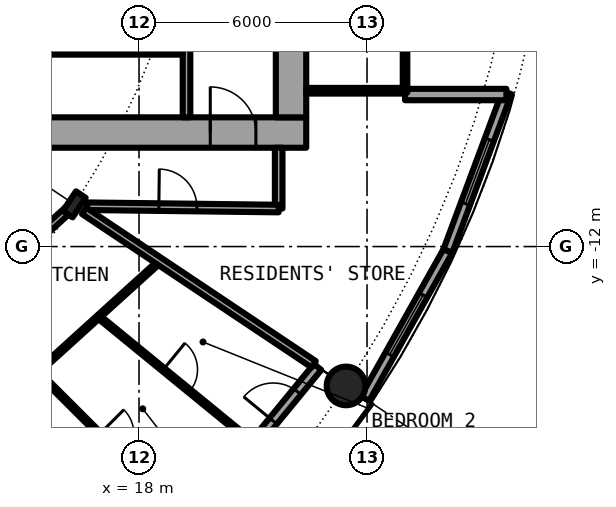
"""IFC4 building model, lengths in metres.
Left out: names, types, materials, properties, quantities, classifications, styles, units other than length and angle.
Written with IfcOpenShell. Run it as: python <this file> out.ifc"""

import sys

from ifc_helpers import new_model, si_unit, direction, frame, frame_2d, origin, origin_2d, place, context, subcontext, project, spatial, rectangle, hollow_circle, i_section, extrude, element, fill, save


model = new_model("IFC4")
c1 = context("Model", 3, precision=1e-05, world=origin(), true_north=direction((0.0, 1.0)))
c2 = subcontext(c1, "Body", "Model", "MODEL_VIEW")
j1 = project(units=[si_unit("LENGTHUNIT", "METRE"), si_unit("PLANEANGLEUNIT", "RADIAN")], contexts=[c1])
p1 = place(None, origin())
s1 = spatial("IfcSite", under=j1, at=p1, CompositionType="ELEMENT")
p2 = place(p1, origin())
s2 = spatial("IfcBuilding", under=s1, at=p2, CompositionType="ELEMENT")
p3 = place(p2, frame((0.0, 0.0, 41.1)))
s3 = spatial("IfcBuildingStorey", under=s2, at=p3, CompositionType="ELEMENT", Elevation=41.1)
p4 = place(p3, frame((23.448, -15.667, 0.0), z_axis=(0.0, 0.0, 1.0), x_axis=(1.0, 0.0, 0.0)))
e1 = element("IfcColumn", 1, at=p4, inside=s3, PredefinedType="COLUMN", context=c2, shape_type="SweptSolid", body=[
    extrude(hollow_circle(Radius=0.508, WallThickness=0.05, at=origin_2d()), origin(), (0.0, 0.0, 1.0), 3.05),
])
p5 = place(p3, frame((16.297, -10.889, 0.0), z_axis=(0.0, 0.0, 1.0), x_axis=(0.831469612303, -0.55557023302, 0.0)))
e2 = element("IfcColumn", 2, at=p5, inside=s3, PredefinedType="COLUMN", context=c2, shape_type="SweptSolid", body=[
    extrude(i_section(OverallWidth=0.305, OverallDepth=0.62, WebThickness=0.021, FlangeThickness=0.04, FilletRadius=0.027, at=origin_2d()), origin(), (0.0, 0.0, 1.0), 3.05),
])
p6 = place(p3, frame((19.304, -19.304, 0.0), z_axis=(0.0, 0.0, 1.0), x_axis=(0.634382322723, 0.773019449054, 0.0)))
e3 = element("IfcWall", 3, at=p6, inside=s3, PredefinedType="SOLIDWALL", context=c2, shape_type="SweptSolid", body=[
    extrude(rectangle(XDim=5.352, YDim=0.25, at=frame_2d((2.676, 0.0))), origin(), (0.0, 0.0, 1.0), 2.7),
])
p7 = place(p6, frame((0.441, 0.0, 0.3)))
e4 = element("IfcOpeningElement", 4, at=p7, cuts=e3, PredefinedType="OPENING", context=c2, shape_type="SweptSolid", body=[
    extrude(rectangle(XDim=1.8, YDim=2.1, at=frame_2d((0.9, 1.05))), frame((0.0, 0.135, 0.0), z_axis=(0.0, -1.0, 0.0), x_axis=(1.0, 0.0, 0.0)), (0.0, 0.0, 1.0), 0.27),
])
p8 = place(p6, frame((3.51, 0.0, 0.0)))
e5 = element("IfcOpeningElement", 5, at=p8, cuts=e3, PredefinedType="OPENING", context=c2, shape_type="SweptSolid", body=[
    extrude(rectangle(XDim=1.0, YDim=2.2, at=frame_2d((0.5, 1.1))), frame((0.0, 0.135, 0.0), z_axis=(0.0, -1.0, 0.0), x_axis=(1.0, 0.0, 0.0)), (0.0, 0.0, 1.0), 0.27),
])
p9 = place(p3, frame((23.946, -16.0, 0.0), z_axis=(0.0, 0.0, 1.0), x_axis=(0.489696356642, 0.871893042919, 0.0)))
e6 = element("IfcWall", 6, at=p9, inside=s3, PredefinedType="SOLIDWALL", context=c2, shape_type="SweptSolid", body=[
    extrude(rectangle(XDim=4.454, YDim=0.25, at=frame_2d((2.227, 0.0))), origin(), (0.0, 0.0, 1.0), 2.7),
])
p10 = place(p9, frame((1.327, 0.0, 0.3)))
e7 = element("IfcOpeningElement", 7, at=p10, cuts=e6, PredefinedType="OPENING", context=c2, shape_type="SweptSolid", body=[
    extrude(rectangle(XDim=1.8, YDim=2.1, at=frame_2d((0.9, 1.05))), frame((0.0, 0.135, 0.0), z_axis=(0.0, -1.0, 0.0), x_axis=(1.0, 0.0, 0.0)), (0.0, 0.0, 1.0), 0.27),
])
p11 = place(p3, frame((26.127, -12.117, 0.0), z_axis=(0.0, 0.0, 1.0), x_axis=(0.349247811493, 0.937030397675, 0.0)))
e8 = element("IfcWall", 8, at=p11, inside=s3, PredefinedType="SOLIDWALL", context=c2, shape_type="SweptSolid", body=[
    extrude(rectangle(XDim=4.452, YDim=0.25, at=frame_2d((2.226, 0.0))), origin(), (0.0, 0.0, 1.0), 2.7),
])
p12 = place(p11, frame((1.327, 0.0, 0.3)))
e9 = element("IfcOpeningElement", 9, at=p12, cuts=e8, PredefinedType="OPENING", context=c2, shape_type="SweptSolid", body=[
    extrude(rectangle(XDim=1.8, YDim=2.1, at=frame_2d((0.9, 1.05))), frame((0.0, 0.135, 0.0), z_axis=(0.0, -1.0, 0.0), x_axis=(1.0, 0.0, 0.0)), (0.0, 0.0, 1.0), 0.27),
])
p13 = place(p3, frame((25.0, -8.0, 0.0), z_axis=(0.0, 0.0, 1.0), x_axis=(1.0, 0.0, 0.0)))
e10 = element("IfcWall", 10, at=p13, inside=s3, PredefinedType="SOLIDWALL", context=c2, shape_type="SweptSolid", body=[
    extrude(rectangle(XDim=2.667, YDim=0.3, at=frame_2d((1.333, 0.0))), origin(), (0.0, 0.0, 1.0), 2.7),
])
p14 = place(p3, frame((8.2, -9.0, 0.0), z_axis=(0.0, 0.0, 1.0), x_axis=(1.0, 0.0, 0.0)))
e11 = element("IfcWall", 11, at=p14, inside=s3, PredefinedType="SHEAR", context=c2, shape_type="SweptSolid", body=[
    extrude(rectangle(XDim=14.2, YDim=0.8, at=frame_2d((7.1, 0.0))), origin(), (0.0, 0.0, 1.0), 3.05),
])
p15 = place(p14, frame((11.675, 0.0, 0.0)))
e12 = element("IfcOpeningElement", 12, at=p15, cuts=e11, PredefinedType="OPENING", context=c2, shape_type="SweptSolid", body=[
    extrude(rectangle(XDim=1.2, YDim=2.3, at=frame_2d((0.6, 1.15))), frame((0.0, 0.41, 0.0), z_axis=(0.0, -1.0, 0.0), x_axis=(1.0, 0.0, 0.0)), (0.0, 0.0, 1.0), 0.82),
])
p16 = place(p3, frame((22.0, 8.6, 0.0), z_axis=(0.0, 0.0, 1.0), x_axis=(0.0, -1.0, 0.0)))
e13 = element("IfcWall", 13, at=p16, inside=s3, PredefinedType="SHEAR", context=c2, shape_type="SweptSolid", body=[
    extrude(rectangle(XDim=17.2, YDim=0.8, at=frame_2d((8.6, 0.0))), origin(), (0.0, 0.0, 1.0), 3.05),
])
p17 = place(p16, frame((7.7, 0.0, 0.0)))
e14 = element("IfcOpeningElement", 14, at=p17, cuts=e13, PredefinedType="OPENING", context=c2, shape_type="SweptSolid", body=[
    extrude(rectangle(XDim=1.8, YDim=2.3, at=frame_2d((0.9, 1.15))), frame((0.0, 0.41, 0.0), z_axis=(0.0, -1.0, 0.0), x_axis=(1.0, 0.0, 0.0)), (0.0, 0.0, 1.0), 0.82),
])
p18 = place(p3, frame((19.25, -8.6, 0.0), z_axis=(0.0, 0.0, 1.0), x_axis=(0.0, 1.0, 0.0)))
e15 = element("IfcWall", 15, at=p18, inside=s3, PredefinedType="SOLIDWALL", context=c2, shape_type="SweptSolid", body=[
    extrude(rectangle(XDim=7.025, YDim=0.2, at=frame_2d((3.513, 0.0))), origin(), (0.0, 0.0, 1.0), 2.7),
])
p19 = place(p18, frame((2.35, 0.0, 0.0)))
e16 = element("IfcOpeningElement", 16, at=p19, cuts=e15, PredefinedType="OPENING", context=c2, shape_type="SweptSolid", body=[
    extrude(rectangle(XDim=1.1, YDim=2.3, at=frame_2d((0.55, 1.15))), frame((0.0, 0.11, 0.0), z_axis=(0.0, -1.0, 0.0), x_axis=(1.0, 0.0, 0.0)), (0.0, 0.0, 1.0), 0.22),
])
p20 = place(p3, frame((15.45, -6.875, 0.0), z_axis=(0.0, 0.0, 1.0), x_axis=(1.0, 0.0, 0.0)))
e17 = element("IfcWall", 17, at=p20, inside=s3, PredefinedType="PARTITIONING", context=c2, shape_type="SweptSolid", body=[
    extrude(rectangle(XDim=3.7, YDim=0.15, at=frame_2d((1.85, 0.0))), origin(), (0.0, 0.0, 1.0), 2.7),
])
p21 = place(p20, frame((1.4, 0.0, 0.0)))
e18 = element("IfcOpeningElement", 18, at=p21, cuts=e17, PredefinedType="OPENING", context=c2, shape_type="SweptSolid", body=[
    extrude(rectangle(XDim=0.9, YDim=2.3, at=frame_2d((0.45, 1.15))), frame((0.0, 0.085, 0.0), z_axis=(0.0, -1.0, 0.0), x_axis=(1.0, 0.0, 0.0)), (0.0, 0.0, 1.0), 0.17),
])
p22 = place(p3, frame((22.4, -7.9, 0.0), z_axis=(0.0, 0.0, 1.0), x_axis=(1.0, 0.0, 0.0)))
e19 = element("IfcWall", 19, at=p22, inside=s3, PredefinedType="PARTITIONING", context=c2, shape_type="SweptSolid", body=[
    extrude(rectangle(XDim=2.54, YDim=0.15, at=frame_2d((1.27, 0.0))), origin(), (0.0, 0.0, 1.0), 2.7),
])
p23 = place(p3, frame((25.0, -7.95, 0.0), z_axis=(0.0, 0.0, 1.0), x_axis=(0.0, 1.0, 0.0)))
e20 = element("IfcWall", 20, at=p23, inside=s3, PredefinedType="PARTITIONING", context=c2, shape_type="SweptSolid", body=[
    extrude(rectangle(XDim=15.9, YDim=0.12, at=frame_2d((7.95, 0.0))), origin(), (0.0, 0.0, 1.0), 2.7),
])
p24 = place(p23, frame((0.95, 0.0, 0.1)))
e21 = element("IfcOpeningElement", 21, at=p24, cuts=e20, PredefinedType="OPENING", context=c2, shape_type="SweptSolid", body=[
    extrude(rectangle(XDim=14.0, YDim=2.35, at=frame_2d((7.0, 1.175))), frame((0.0, 0.07, 0.0), z_axis=(0.0, -1.0, 0.0), x_axis=(1.0, 0.0, 0.0)), (0.0, 0.0, 1.0), 0.14),
])
p25 = place(p3, frame((21.675, -11.0, 0.0), z_axis=(0.0, 0.0, 1.0), x_axis=(0.0, 1.0, 0.0)))
e22 = element("IfcWall", 22, at=p25, inside=s3, PredefinedType="PARTITIONING", context=c2, shape_type="SweptSolid", body=[
    extrude(rectangle(XDim=1.6, YDim=0.2, at=frame_2d((0.8, 0.0))), origin(), (0.0, 0.0, 1.0), 2.7),
])
p26 = place(p3, frame((15.33, -15.301, 0.0), z_axis=(0.0, 0.0, 1.0), x_axis=(0.741109646243, 0.671384012504, 0.0)))
e23 = element("IfcWall", 23, at=p26, inside=s3, PredefinedType="PARTITIONING", context=c2, shape_type="SweptSolid", body=[
    extrude(rectangle(XDim=4.331, YDim=0.1, at=frame_2d((2.166, 0.0))), origin(), (0.0, 0.0, 1.0), 2.7),
])
p27 = place(p3, frame((9.239, -17.287, 0.0), z_axis=(0.0, 0.0, 1.0), x_axis=(0.74089212117, 0.671624050186, 0.0)))
e24 = element("IfcWall", 24, at=p27, inside=s3, PredefinedType="PARTITIONING", context=c2, shape_type="SweptSolid", body=[
    extrude(rectangle(XDim=9.368, YDim=0.2, at=frame_2d((4.684, 0.0))), origin(), (0.0, 0.0, 1.0), 2.38),
])
p28 = place(p27, frame((4.263, 0.0, 0.0)))
e25 = element("IfcOpeningElement", 25, at=p28, cuts=e24, PredefinedType="OPENING", context=c2, shape_type="SweptSolid", body=[
    extrude(rectangle(XDim=1.0, YDim=2.3, at=frame_2d((0.5, 1.15))), frame((0.0, 0.11, 0.0), z_axis=(0.0, -1.0, 0.0), x_axis=(1.0, 0.0, 0.0)), (0.0, 0.0, 1.0), 0.22),
])
p29 = place(p3, frame((16.636, -10.939, 0.0), z_axis=(0.0, 0.0, 1.0), x_axis=(0.999926652916, -0.012111514691, 0.0)))
e26 = element("IfcWall", 26, at=p29, inside=s3, PredefinedType="PARTITIONING", context=c2, shape_type="SweptSolid", body=[
    extrude(rectangle(XDim=5.04, YDim=0.2, at=frame_2d((2.52, 0.0))), origin(), (0.0, 0.0, 1.0), 2.7),
])
p30 = place(p29, frame((1.886, 0.0, 0.0)))
e27 = element("IfcOpeningElement", 27, at=p30, cuts=e26, PredefinedType="OPENING", context=c2, shape_type="SweptSolid", body=[
    extrude(rectangle(XDim=1.0, YDim=2.3, at=frame_2d((0.5, 1.15))), frame((0.0, 0.11, 0.0), z_axis=(0.0, -1.0, 0.0), x_axis=(1.0, 0.0, 0.0)), (0.0, 0.0, 1.0), 0.22),
])
p31 = place(p3, frame((13.474, -13.448, 0.0), z_axis=(0.0, 0.0, 1.0), x_axis=(0.707901324545, -0.706311344031, 0.0)))
e28 = element("IfcWall", 28, at=p31, inside=s3, PredefinedType="PARTITIONING", context=c2, shape_type="SweptSolid", body=[
    extrude(rectangle(XDim=8.138, YDim=0.1, at=frame_2d((4.069, 0.0))), origin(), (0.0, 0.0, 1.0), 2.7),
])
p32 = place(p31, frame((0.861, 0.0, 0.0)))
e29 = element("IfcOpeningElement", 29, at=p32, cuts=e28, PredefinedType="OPENING", context=c2, shape_type="SweptSolid", body=[
    extrude(rectangle(XDim=0.9, YDim=2.3, at=frame_2d((0.45, 1.15))), frame((0.0, 0.06, 0.0), z_axis=(0.0, -1.0, 0.0), x_axis=(1.0, 0.0, 0.0)), (0.0, 0.0, 1.0), 0.12),
])
p33 = place(p31, frame((4.931, 0.0, 0.0)))
e30 = element("IfcOpeningElement", 30, at=p33, cuts=e28, PredefinedType="OPENING", context=c2, shape_type="SweptSolid", body=[
    extrude(rectangle(XDim=0.9, YDim=2.3, at=frame_2d((0.45, 1.15))), frame((0.0, 0.06, 0.0), z_axis=(0.0, -1.0, 0.0), x_axis=(1.0, 0.0, 0.0)), (0.0, 0.0, 1.0), 0.12),
])
p34 = place(p3, frame((16.555, -11.061, 0.0), z_axis=(0.0, 0.0, 1.0), x_axis=(0.831507055747, -0.555514190857, 0.0)))
e31 = element("IfcWall", 31, at=p34, inside=s3, PredefinedType="PARTITIONING", context=c2, shape_type="SweptSolid", body=[
    extrude(rectangle(XDim=7.265, YDim=0.2, at=frame_2d((3.633, 0.0))), origin(), (0.0, 0.0, 1.0), 2.7),
])
p35 = place(p3, frame((16.936, -13.845, 0.0), z_axis=(0.0, 0.0, 1.0), x_axis=(0.774310172558, -0.632806255241, 0.0)))
e32 = element("IfcWall", 32, at=p35, inside=s3, PredefinedType="PARTITIONING", context=c2, shape_type="SweptSolid", body=[
    extrude(rectangle(XDim=5.3, YDim=0.1, at=frame_2d((2.65, 0.0))), origin(), (0.0, 0.0, 1.0), 2.7),
])
p36 = place(p35, frame((2.2, 0.0, 0.0)))
e33 = element("IfcOpeningElement", 33, at=p36, cuts=e32, PredefinedType="OPENING", context=c2, shape_type="SweptSolid", body=[
    extrude(rectangle(XDim=0.9, YDim=2.3, at=frame_2d((0.45, 1.15))), frame((0.0, 0.06, 0.0), z_axis=(0.0, -1.0, 0.0), x_axis=(1.0, 0.0, 0.0)), (0.0, 0.0, 1.0), 0.12),
])
p37 = place(p8, origin())
e34 = element("IfcDoor", 34, at=p37, inside=s3, OperationType="SINGLE_SWING_LEFT", PredefinedType="DOOR", context=c2, shape_type="SweptSolid", body=[
    extrude(rectangle(XDim=1.0, YDim=2.2, at=frame_2d((0.5, 1.1))), frame((0.0, 0.025, 0.0), z_axis=(0.0, -1.0, 0.0), x_axis=(1.0, 0.0, 0.0)), (0.0, 0.0, 1.0), 0.05),
])
fill(e5, e34)
p38 = place(p10, origin())
e35 = element("IfcWindow", 35, at=p38, inside=s3, PartitioningType="SINGLE_PANEL", PredefinedType="WINDOW", context=c2, shape_type="SweptSolid", body=[
    extrude(rectangle(XDim=1.8, YDim=2.1, at=frame_2d((0.9, 1.05))), frame((0.0, 0.03, 0.0), z_axis=(0.0, -1.0, 0.0), x_axis=(1.0, 0.0, 0.0)), (0.0, 0.0, 1.0), 0.06),
])
fill(e7, e35)
p39 = place(p12, origin())
e36 = element("IfcWindow", 36, at=p39, inside=s3, PartitioningType="SINGLE_PANEL", PredefinedType="WINDOW", context=c2, shape_type="SweptSolid", body=[
    extrude(rectangle(XDim=1.8, YDim=2.1, at=frame_2d((0.9, 1.05))), frame((0.0, 0.03, 0.0), z_axis=(0.0, -1.0, 0.0), x_axis=(1.0, 0.0, 0.0)), (0.0, 0.0, 1.0), 0.06),
])
fill(e9, e36)
p40 = place(p21, origin())
e37 = element("IfcDoor", 37, at=p40, inside=s3, OperationType="SINGLE_SWING_LEFT", PredefinedType="DOOR", context=c2, shape_type="SweptSolid", body=[
    extrude(rectangle(XDim=0.9, YDim=2.3, at=frame_2d((0.45, 1.15))), frame((0.0, 0.025, 0.0), z_axis=(0.0, -1.0, 0.0), x_axis=(1.0, 0.0, 0.0)), (0.0, 0.0, 1.0), 0.05),
])
fill(e18, e37)
p41 = place(p15, origin())
e38 = element("IfcDoor", 38, at=p41, inside=s3, OperationType="SINGLE_SWING_LEFT", PredefinedType="DOOR", context=c2, shape_type="SweptSolid", body=[
    extrude(rectangle(XDim=1.2, YDim=2.3, at=frame_2d((0.6, 1.15))), frame((0.0, 0.025, 0.0), z_axis=(0.0, -1.0, 0.0), x_axis=(1.0, 0.0, 0.0)), (0.0, 0.0, 1.0), 0.05),
])
fill(e12, e38)
p42 = place(p24, origin())
e39 = element("IfcWindow", 39, at=p42, inside=s3, PartitioningType="SINGLE_PANEL", PredefinedType="WINDOW", context=c2, shape_type="SweptSolid", body=[
    extrude(rectangle(XDim=14.0, YDim=2.35, at=frame_2d((7.0, 1.175))), frame((0.0, 0.03, 0.0), z_axis=(0.0, -1.0, 0.0), x_axis=(1.0, 0.0, 0.0)), (0.0, 0.0, 1.0), 0.06),
])
fill(e21, e39)
p43 = place(p36, origin())
e40 = element("IfcDoor", 40, at=p43, inside=s3, OperationType="SINGLE_SWING_LEFT", PredefinedType="DOOR", context=c2, shape_type="SweptSolid", body=[
    extrude(rectangle(XDim=0.9, YDim=2.3, at=frame_2d((0.45, 1.15))), frame((0.0, 0.025, 0.0), z_axis=(0.0, -1.0, 0.0), x_axis=(1.0, 0.0, 0.0)), (0.0, 0.0, 1.0), 0.05),
])
fill(e33, e40)
p44 = place(p30, origin())
e41 = element("IfcDoor", 41, at=p44, inside=s3, OperationType="SINGLE_SWING_LEFT", PredefinedType="DOOR", context=c2, shape_type="SweptSolid", body=[
    extrude(rectangle(XDim=1.0, YDim=2.3, at=frame_2d((0.5, 1.15))), frame((0.0, 0.025, 0.0), z_axis=(0.0, -1.0, 0.0), x_axis=(1.0, 0.0, 0.0)), (0.0, 0.0, 1.0), 0.05),
])
fill(e27, e41)
save(model, sys.argv[1])
